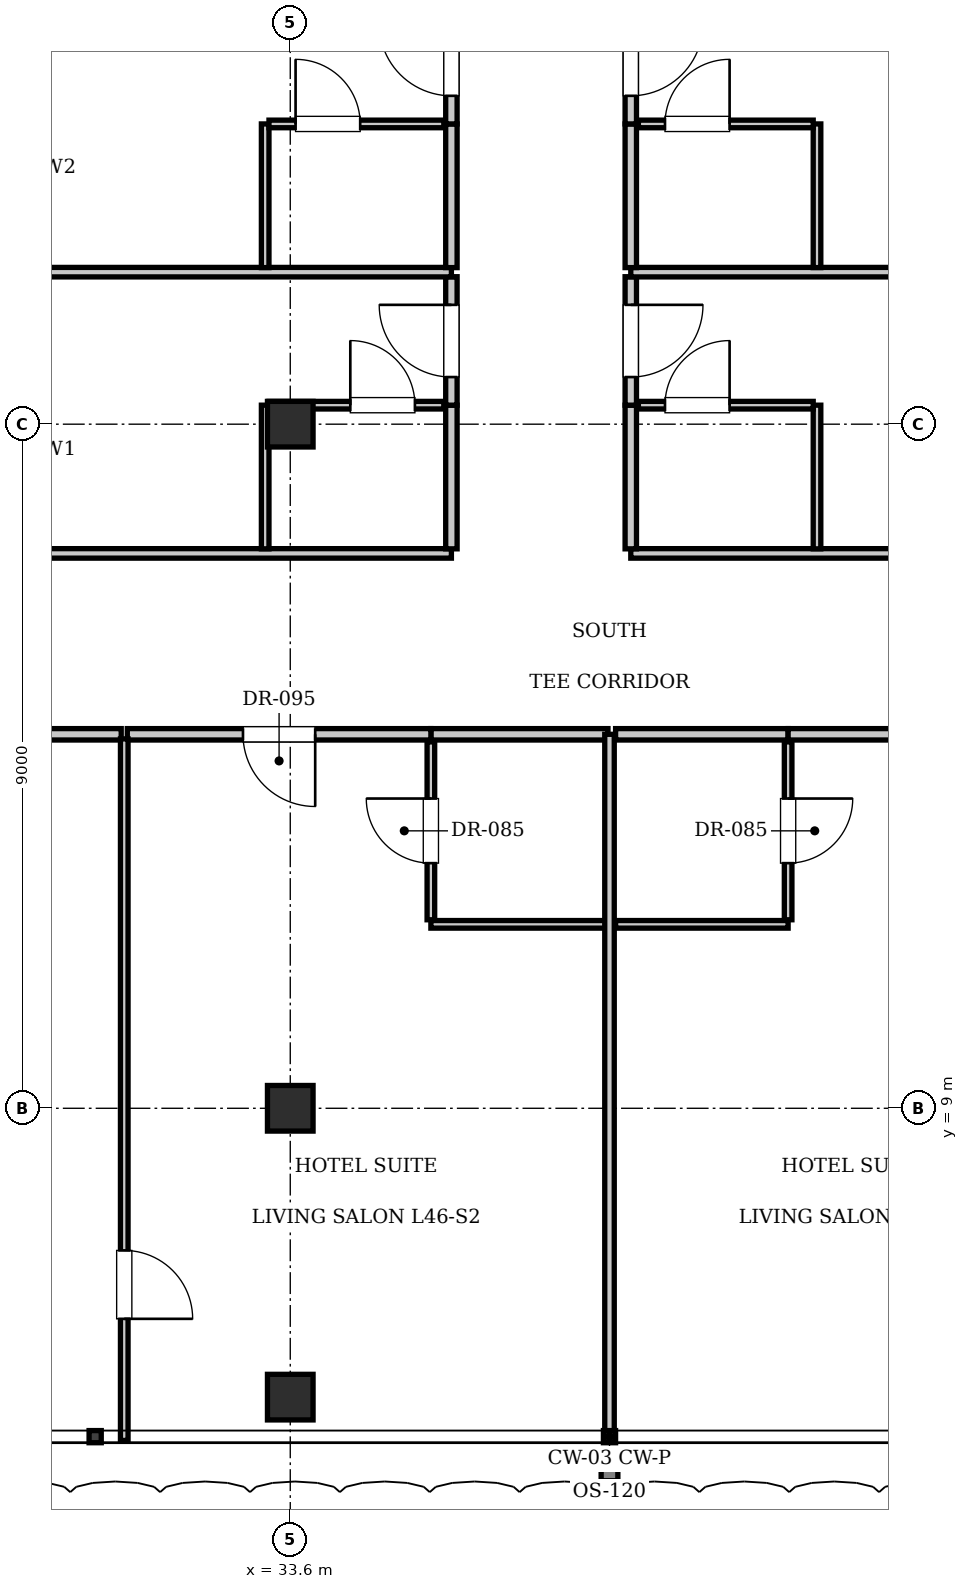
"""IFC4 building model, lengths in metres.
Left out: names, types, materials, properties, quantities, classifications, styles, units other than length and angle.
Written with IfcOpenShell. Run it as: python <this file> out.ifc"""

import sys

from ifc_helpers import new_model, si_unit, direction, frame, frame_2d, origin, origin_2d, place, context, subcontext, project, spatial, rectangle, i_section, extrude, element, fill, save


model = new_model("IFC4")
c1 = context("Model", 3, precision=1e-05, world=origin(), true_north=direction((0.0, 1.0)))
c2 = subcontext(c1, "Body", "Model", "MODEL_VIEW")
j1 = project(units=[si_unit("LENGTHUNIT", "METRE"), si_unit("PLANEANGLEUNIT", "RADIAN")], contexts=[c1])
p1 = place(None, origin())
s1 = spatial("IfcSite", under=j1, at=p1, CompositionType="ELEMENT")
p2 = place(p1, origin())
s2 = spatial("IfcBuilding", under=s1, at=p2, CompositionType="ELEMENT")
p3 = place(p2, frame((0.0, 0.0, 189.0)))
s3 = spatial("IfcBuildingStorey", under=s2, at=p3, CompositionType="ELEMENT", Elevation=189.0)
for number, where, z_axis, x_axis in (
    (1, (33.6, 9.0, 0.0), (0.0, 0.0, 1.0), (1.0, 0.0, 0.0)),
    (2, (33.6, 18.0, 0.0), (0.0, 0.0, 1.0), (1.0, 0.0, 0.0)),
    (3, (33.6, 5.2, 0.0), (0.0, 0.0, 1.0), (1.0, 0.0, 0.0)),
):
    element("IfcColumn", number, at=place(p3, frame(where, z_axis=z_axis, x_axis=x_axis)), inside=s3, PredefinedType="COLUMN", context=c2, shape_type="SweptSolid", body=[
        extrude(i_section(OverallWidth=0.6, OverallDepth=0.6, WebThickness=0.025, FlangeThickness=0.038, at=origin_2d()), origin(), (0.0, 0.0, 1.0), 3.85),
    ])
p4 = place(p3, frame((35.45, 13.92, 0.0), z_axis=(0.0, 0.0, 1.0), x_axis=(1.0, 0.0, 0.0)))
e4 = element("IfcWall", 4, at=p4, inside=s3, PredefinedType="PARTITIONING", context=c2, shape_type="SweptSolid", body=[
    extrude(rectangle(XDim=2.33, YDim=0.15, at=frame_2d((1.165, 0.0))), origin(), (0.0, 0.0, 1.0), 3.61),
])
p5 = place(p3, frame((35.45, 11.42, 0.0), z_axis=(0.0, 0.0, 1.0), x_axis=(1.0, 0.0, 0.0)))
e5 = element("IfcWall", 5, at=p5, inside=s3, PredefinedType="PARTITIONING", context=c2, shape_type="SweptSolid", body=[
    extrude(rectangle(XDim=2.31, YDim=0.1, at=frame_2d((1.155, 0.0))), origin(), (0.0, 0.0, 1.0), 3.61),
])
p6 = place(p3, frame((35.45, 11.48, 0.0), z_axis=(0.0, 0.0, 1.0), x_axis=(0.0, 1.0, 0.0)))
e6 = element("IfcWall", 6, at=p6, inside=s3, PredefinedType="PARTITIONING", context=c2, shape_type="SweptSolid", body=[
    extrude(rectangle(XDim=2.34, YDim=0.1, at=frame_2d((1.17, 0.0))), origin(), (0.0, 0.0, 1.0), 3.61),
])
p7 = place(p6, frame((0.745, 0.0, 0.0)))
e7 = element("IfcOpeningElement", 7, at=p7, cuts=e6, PredefinedType="OPENING", context=c2, shape_type="SweptSolid", body=[
    extrude(rectangle(XDim=0.85, YDim=2.1, at=frame_2d((0.425, 1.05))), frame((0.0, 0.06, 0.0), z_axis=(0.0, -1.0, 0.0), x_axis=(1.0, 0.0, 0.0)), (0.0, 0.0, 1.0), 0.12),
])
p8 = place(p3, frame((26.42, 13.92, 0.0), z_axis=(0.0, 0.0, 1.0), x_axis=(1.0, 0.0, 0.0)))
e8 = element("IfcWall", 8, at=p8, inside=s3, PredefinedType="PARTITIONING", context=c2, shape_type="SweptSolid", body=[
    extrude(rectangle(XDim=4.956, YDim=0.15, at=frame_2d((2.478, 0.0))), origin(), (0.0, 0.0, 1.0), 3.61),
])
p9 = place(p3, frame((31.456, 13.92, 0.0), z_axis=(0.0, 0.0, 1.0), x_axis=(1.0, 0.0, 0.0)))
e9 = element("IfcWall", 9, at=p9, inside=s3, PredefinedType="PARTITIONING", context=c2, shape_type="SweptSolid", body=[
    extrude(rectangle(XDim=3.994, YDim=0.15, at=frame_2d((1.997, 0.0))), origin(), (0.0, 0.0, 1.0), 3.61),
])
p10 = place(p9, frame((1.522, 0.0, 0.0)))
e10 = element("IfcOpeningElement", 10, at=p10, cuts=e9, PredefinedType="OPENING", context=c2, shape_type="SweptSolid", body=[
    extrude(rectangle(XDim=0.95, YDim=2.15, at=frame_2d((0.475, 1.075))), frame((0.0, 0.085, 0.0), z_axis=(0.0, -1.0, 0.0), x_axis=(1.0, 0.0, 0.0)), (0.0, 0.0, 1.0), 0.17),
])
p11 = place(p3, frame((31.416, 4.63, 0.0), z_axis=(0.0, 0.0, 1.0), x_axis=(0.0, 1.0, 0.0)))
e11 = element("IfcWall", 11, at=p11, inside=s3, PredefinedType="PARTITIONING", context=c2, shape_type="SweptSolid", body=[
    extrude(rectangle(XDim=9.23, YDim=0.1, at=frame_2d((4.615, 0.0))), origin(), (0.0, 0.0, 1.0), 3.61),
])
p12 = place(p11, frame((1.6, 0.0, 0.0)))
e12 = element("IfcOpeningElement", 12, at=p12, cuts=e11, PredefinedType="OPENING", context=c2, shape_type="SweptSolid", body=[
    extrude(rectangle(XDim=0.9, YDim=2.1, at=frame_2d((0.45, 1.05))), frame((0.0, 0.06, 0.0), z_axis=(0.0, -1.0, 0.0), x_axis=(1.0, 0.0, 0.0)), (0.0, 0.0, 1.0), 0.12),
])
p13 = place(p3, frame((37.8, 4.7, 0.0), z_axis=(0.0, 0.0, 1.0), x_axis=(0.0, 1.0, 0.0)))
e13 = element("IfcWall", 13, at=p13, inside=s3, PredefinedType="PARTITIONING", context=c2, shape_type="SweptSolid", body=[
    extrude(rectangle(XDim=9.22, YDim=0.125, at=frame_2d((4.61, 0.0))), origin(), (0.0, 0.0, 1.0), 3.293),
])
p14 = place(p3, frame((37.88, 13.92, 0.0), z_axis=(0.0, 0.0, 1.0), x_axis=(1.0, 0.0, 0.0)))
e14 = element("IfcWall", 14, at=p14, inside=s3, PredefinedType="PARTITIONING", context=c2, shape_type="SweptSolid", body=[
    extrude(rectangle(XDim=2.27, YDim=0.15, at=frame_2d((1.135, 0.0))), origin(), (0.0, 0.0, 1.0), 3.61),
])
p15 = place(p3, frame((37.88, 11.42, 0.0), z_axis=(0.0, 0.0, 1.0), x_axis=(1.0, 0.0, 0.0)))
e15 = element("IfcWall", 15, at=p15, inside=s3, PredefinedType="PARTITIONING", context=c2, shape_type="SweptSolid", body=[
    extrude(rectangle(XDim=2.27, YDim=0.1, at=frame_2d((1.135, 0.0))), origin(), (0.0, 0.0, 1.0), 3.61),
])
p16 = place(p3, frame((40.15, 11.48, 0.0), z_axis=(0.0, 0.0, 1.0), x_axis=(0.0, 1.0, 0.0)))
e16 = element("IfcWall", 16, at=p16, inside=s3, PredefinedType="PARTITIONING", context=c2, shape_type="SweptSolid", body=[
    extrude(rectangle(XDim=2.34, YDim=0.1, at=frame_2d((1.17, 0.0))), origin(), (0.0, 0.0, 1.0), 3.61),
])
p17 = place(p16, frame((0.745, 0.0, 0.0)))
e17 = element("IfcOpeningElement", 17, at=p17, cuts=e16, PredefinedType="OPENING", context=c2, shape_type="SweptSolid", body=[
    extrude(rectangle(XDim=0.85, YDim=2.1, at=frame_2d((0.425, 1.05))), frame((0.0, 0.06, 0.0), z_axis=(0.0, -1.0, 0.0), x_axis=(1.0, 0.0, 0.0)), (0.0, 0.0, 1.0), 0.12),
])
p18 = place(p3, frame((40.15, 13.92, 0.0), z_axis=(0.0, 0.0, 1.0), x_axis=(1.0, 0.0, 0.0)))
e18 = element("IfcWall", 18, at=p18, inside=s3, PredefinedType="PARTITIONING", context=c2, shape_type="SweptSolid", body=[
    extrude(rectangle(XDim=3.994, YDim=0.15, at=frame_2d((1.997, 0.0))), origin(), (0.0, 0.0, 1.0), 3.61),
])
p19 = place(p18, frame((1.522, 0.0, 0.0)))
e19 = element("IfcOpeningElement", 19, at=p19, cuts=e18, PredefinedType="OPENING", context=c2, shape_type="SweptSolid", body=[
    extrude(rectangle(XDim=0.95, YDim=2.15, at=frame_2d((0.475, 1.075))), frame((0.0, 0.085, 0.0), z_axis=(0.0, -1.0, 0.0), x_axis=(1.0, 0.0, 0.0)), (0.0, 0.0, 1.0), 0.17),
])
p20 = place(p3, frame((13.2, 16.3, 0.0), z_axis=(0.0, 0.0, 1.0), x_axis=(1.0, 0.0, 0.0)))
e20 = element("IfcWall", 20, at=p20, inside=s3, PredefinedType="PARTITIONING", context=c2, shape_type="SweptSolid", body=[
    extrude(rectangle(XDim=22.52, YDim=0.125, at=frame_2d((11.26, 0.0))), origin(), (0.0, 0.0, 1.0), 3.61),
])
p21 = place(p3, frame((38.08, 16.3, 0.0), z_axis=(0.0, 0.0, 1.0), x_axis=(1.0, 0.0, 0.0)))
e21 = element("IfcWall", 21, at=p21, inside=s3, PredefinedType="PARTITIONING", context=c2, shape_type="SweptSolid", body=[
    extrude(rectangle(XDim=24.32, YDim=0.125, at=frame_2d((12.16, 0.0))), origin(), (0.0, 0.0, 1.0), 3.61),
])
p22 = place(p3, frame((35.72, 16.36, 0.0), z_axis=(0.0, 0.0, 1.0), x_axis=(0.0, 1.0, 0.0)))
e22 = element("IfcWall", 22, at=p22, inside=s3, PredefinedType="PARTITIONING", context=c2, shape_type="SweptSolid", body=[
    extrude(rectangle(XDim=1.89, YDim=0.15, at=frame_2d((0.945, 0.0))), origin(), (0.0, 0.0, 1.0), 3.61),
])
p23 = place(p3, frame((35.72, 18.25, 0.0), z_axis=(0.0, 0.0, 1.0), x_axis=(0.0, 1.0, 0.0)))
e23 = element("IfcWall", 23, at=p23, inside=s3, PredefinedType="PARTITIONING", context=c2, shape_type="SweptSolid", body=[
    extrude(rectangle(XDim=1.69, YDim=0.15, at=frame_2d((0.845, 0.0))), origin(), (0.0, 0.0, 1.0), 3.61),
])
p24 = place(p23, frame((0.37, 0.0, 0.0)))
e24 = element("IfcOpeningElement", 24, at=p24, cuts=e23, PredefinedType="OPENING", context=c2, shape_type="SweptSolid", body=[
    extrude(rectangle(XDim=0.95, YDim=2.15, at=frame_2d((0.475, 1.075))), frame((0.0, 0.085, 0.0), z_axis=(0.0, -1.0, 0.0), x_axis=(1.0, 0.0, 0.0)), (0.0, 0.0, 1.0), 0.17),
])
p25 = place(p3, frame((33.27, 16.36, 0.0), z_axis=(0.0, 0.0, 1.0), x_axis=(0.0, 1.0, 0.0)))
e25 = element("IfcWall", 25, at=p25, inside=s3, PredefinedType="PARTITIONING", context=c2, shape_type="SweptSolid", body=[
    extrude(rectangle(XDim=1.89, YDim=0.1, at=frame_2d((0.945, 0.0))), origin(), (0.0, 0.0, 1.0), 3.61),
])
p26 = place(p3, frame((33.32, 18.25, 0.0), z_axis=(0.0, 0.0, 1.0), x_axis=(1.0, 0.0, 0.0)))
e26 = element("IfcWall", 26, at=p26, inside=s3, PredefinedType="PARTITIONING", context=c2, shape_type="SweptSolid", body=[
    extrude(rectangle(XDim=2.3, YDim=0.1, at=frame_2d((1.15, 0.0))), origin(), (0.0, 0.0, 1.0), 3.61),
])
p27 = place(p26, frame((1.07, 0.0, 0.0)))
e27 = element("IfcOpeningElement", 27, at=p27, cuts=e26, PredefinedType="OPENING", context=c2, shape_type="SweptSolid", body=[
    extrude(rectangle(XDim=0.85, YDim=2.1, at=frame_2d((0.425, 1.05))), frame((0.0, 0.06, 0.0), z_axis=(0.0, -1.0, 0.0), x_axis=(1.0, 0.0, 0.0)), (0.0, 0.0, 1.0), 0.12),
])
p28 = place(p3, frame((38.08, 16.36, 0.0), z_axis=(0.0, 0.0, 1.0), x_axis=(0.0, 1.0, 0.0)))
e28 = element("IfcWall", 28, at=p28, inside=s3, PredefinedType="PARTITIONING", context=c2, shape_type="SweptSolid", body=[
    extrude(rectangle(XDim=1.89, YDim=0.15, at=frame_2d((0.945, 0.0))), origin(), (0.0, 0.0, 1.0), 3.61),
])
p29 = place(p3, frame((38.08, 18.25, 0.0), z_axis=(0.0, 0.0, 1.0), x_axis=(0.0, 1.0, 0.0)))
e29 = element("IfcWall", 29, at=p29, inside=s3, PredefinedType="PARTITIONING", context=c2, shape_type="SweptSolid", body=[
    extrude(rectangle(XDim=1.69, YDim=0.15, at=frame_2d((0.845, 0.0))), origin(), (0.0, 0.0, 1.0), 3.61),
])
p30 = place(p29, frame((0.37, 0.0, 0.0)))
e30 = element("IfcOpeningElement", 30, at=p30, cuts=e29, PredefinedType="OPENING", context=c2, shape_type="SweptSolid", body=[
    extrude(rectangle(XDim=0.95, YDim=2.15, at=frame_2d((0.475, 1.075))), frame((0.0, 0.085, 0.0), z_axis=(0.0, -1.0, 0.0), x_axis=(1.0, 0.0, 0.0)), (0.0, 0.0, 1.0), 0.17),
])
p31 = place(p3, frame((40.53, 16.36, 0.0), z_axis=(0.0, 0.0, 1.0), x_axis=(0.0, 1.0, 0.0)))
e31 = element("IfcWall", 31, at=p31, inside=s3, PredefinedType="PARTITIONING", context=c2, shape_type="SweptSolid", body=[
    extrude(rectangle(XDim=1.89, YDim=0.1, at=frame_2d((0.945, 0.0))), origin(), (0.0, 0.0, 1.0), 3.61),
])
p32 = place(p3, frame((38.18, 18.25, 0.0), z_axis=(0.0, 0.0, 1.0), x_axis=(1.0, 0.0, 0.0)))
e32 = element("IfcWall", 32, at=p32, inside=s3, PredefinedType="PARTITIONING", context=c2, shape_type="SweptSolid", body=[
    extrude(rectangle(XDim=2.3, YDim=0.1, at=frame_2d((1.15, 0.0))), origin(), (0.0, 0.0, 1.0), 3.61),
])
p33 = place(p32, frame((0.35, 0.0, 0.0)))
e33 = element("IfcOpeningElement", 33, at=p33, cuts=e32, PredefinedType="OPENING", context=c2, shape_type="SweptSolid", body=[
    extrude(rectangle(XDim=0.85, YDim=2.1, at=frame_2d((0.425, 1.05))), frame((0.0, 0.06, 0.0), z_axis=(0.0, -1.0, 0.0), x_axis=(1.0, 0.0, 0.0)), (0.0, 0.0, 1.0), 0.12),
])
p34 = place(p3, frame((13.2, 20.0, 0.0), z_axis=(0.0, 0.0, 1.0), x_axis=(1.0, 0.0, 0.0)))
e34 = element("IfcWall", 34, at=p34, inside=s3, PredefinedType="PARTITIONING", context=c2, shape_type="SweptSolid", body=[
    extrude(rectangle(XDim=22.52, YDim=0.125, at=frame_2d((11.26, 0.0))), origin(), (0.0, 0.0, 1.0), 3.61),
])
p35 = place(p3, frame((38.08, 20.0, 0.0), z_axis=(0.0, 0.0, 1.0), x_axis=(1.0, 0.0, 0.0)))
e35 = element("IfcWall", 35, at=p35, inside=s3, PredefinedType="PARTITIONING", context=c2, shape_type="SweptSolid", body=[
    extrude(rectangle(XDim=24.32, YDim=0.125, at=frame_2d((12.16, 0.0))), origin(), (0.0, 0.0, 1.0), 3.61),
])
p36 = place(p3, frame((35.72, 20.06, 0.0), z_axis=(0.0, 0.0, 1.0), x_axis=(0.0, 1.0, 0.0)))
e36 = element("IfcWall", 36, at=p36, inside=s3, PredefinedType="PARTITIONING", context=c2, shape_type="SweptSolid", body=[
    extrude(rectangle(XDim=1.89, YDim=0.15, at=frame_2d((0.945, 0.0))), origin(), (0.0, 0.0, 1.0), 3.61),
])
p37 = place(p3, frame((35.72, 21.95, 0.0), z_axis=(0.0, 0.0, 1.0), x_axis=(0.0, 1.0, 0.0)))
e37 = element("IfcWall", 37, at=p37, inside=s3, PredefinedType="PARTITIONING", context=c2, shape_type="SweptSolid", body=[
    extrude(rectangle(XDim=1.69, YDim=0.15, at=frame_2d((0.845, 0.0))), origin(), (0.0, 0.0, 1.0), 3.61),
])
p38 = place(p37, frame((0.37, 0.0, 0.0)))
e38 = element("IfcOpeningElement", 38, at=p38, cuts=e37, PredefinedType="OPENING", context=c2, shape_type="SweptSolid", body=[
    extrude(rectangle(XDim=0.95, YDim=2.15, at=frame_2d((0.475, 1.075))), frame((0.0, 0.085, 0.0), z_axis=(0.0, -1.0, 0.0), x_axis=(1.0, 0.0, 0.0)), (0.0, 0.0, 1.0), 0.17),
])
p39 = place(p3, frame((33.27, 20.06, 0.0), z_axis=(0.0, 0.0, 1.0), x_axis=(0.0, 1.0, 0.0)))
e39 = element("IfcWall", 39, at=p39, inside=s3, PredefinedType="PARTITIONING", context=c2, shape_type="SweptSolid", body=[
    extrude(rectangle(XDim=1.89, YDim=0.1, at=frame_2d((0.945, 0.0))), origin(), (0.0, 0.0, 1.0), 3.61),
])
p40 = place(p3, frame((33.32, 21.95, 0.0), z_axis=(0.0, 0.0, 1.0), x_axis=(1.0, 0.0, 0.0)))
e40 = element("IfcWall", 40, at=p40, inside=s3, PredefinedType="PARTITIONING", context=c2, shape_type="SweptSolid", body=[
    extrude(rectangle(XDim=2.3, YDim=0.1, at=frame_2d((1.15, 0.0))), origin(), (0.0, 0.0, 1.0), 3.61),
])
p41 = place(p40, frame((0.35, 0.0, 0.0)))
e41 = element("IfcOpeningElement", 41, at=p41, cuts=e40, PredefinedType="OPENING", context=c2, shape_type="SweptSolid", body=[
    extrude(rectangle(XDim=0.85, YDim=2.1, at=frame_2d((0.425, 1.05))), frame((0.0, 0.06, 0.0), z_axis=(0.0, -1.0, 0.0), x_axis=(1.0, 0.0, 0.0)), (0.0, 0.0, 1.0), 0.12),
])
p42 = place(p3, frame((38.08, 20.06, 0.0), z_axis=(0.0, 0.0, 1.0), x_axis=(0.0, 1.0, 0.0)))
e42 = element("IfcWall", 42, at=p42, inside=s3, PredefinedType="PARTITIONING", context=c2, shape_type="SweptSolid", body=[
    extrude(rectangle(XDim=1.89, YDim=0.15, at=frame_2d((0.945, 0.0))), origin(), (0.0, 0.0, 1.0), 3.61),
])
p43 = place(p3, frame((38.08, 21.95, 0.0), z_axis=(0.0, 0.0, 1.0), x_axis=(0.0, 1.0, 0.0)))
e43 = element("IfcWall", 43, at=p43, inside=s3, PredefinedType="PARTITIONING", context=c2, shape_type="SweptSolid", body=[
    extrude(rectangle(XDim=1.69, YDim=0.15, at=frame_2d((0.845, 0.0))), origin(), (0.0, 0.0, 1.0), 3.61),
])
p44 = place(p43, frame((0.37, 0.0, 0.0)))
e44 = element("IfcOpeningElement", 44, at=p44, cuts=e43, PredefinedType="OPENING", context=c2, shape_type="SweptSolid", body=[
    extrude(rectangle(XDim=0.95, YDim=2.15, at=frame_2d((0.475, 1.075))), frame((0.0, 0.085, 0.0), z_axis=(0.0, -1.0, 0.0), x_axis=(1.0, 0.0, 0.0)), (0.0, 0.0, 1.0), 0.17),
])
p45 = place(p3, frame((40.53, 20.06, 0.0), z_axis=(0.0, 0.0, 1.0), x_axis=(0.0, 1.0, 0.0)))
e45 = element("IfcWall", 45, at=p45, inside=s3, PredefinedType="PARTITIONING", context=c2, shape_type="SweptSolid", body=[
    extrude(rectangle(XDim=1.89, YDim=0.1, at=frame_2d((0.945, 0.0))), origin(), (0.0, 0.0, 1.0), 3.61),
])
p46 = place(p3, frame((38.18, 21.95, 0.0), z_axis=(0.0, 0.0, 1.0), x_axis=(1.0, 0.0, 0.0)))
e46 = element("IfcWall", 46, at=p46, inside=s3, PredefinedType="PARTITIONING", context=c2, shape_type="SweptSolid", body=[
    extrude(rectangle(XDim=2.3, YDim=0.1, at=frame_2d((1.15, 0.0))), origin(), (0.0, 0.0, 1.0), 3.61),
])
p47 = place(p46, frame((0.35, 0.0, 0.0)))
e47 = element("IfcOpeningElement", 47, at=p47, cuts=e46, PredefinedType="OPENING", context=c2, shape_type="SweptSolid", body=[
    extrude(rectangle(XDim=0.85, YDim=2.1, at=frame_2d((0.425, 1.05))), frame((0.0, 0.06, 0.0), z_axis=(0.0, -1.0, 0.0), x_axis=(1.0, 0.0, 0.0)), (0.0, 0.0, 1.0), 0.12),
])
p48 = place(p7, origin())
e48 = element("IfcDoor", 48, at=p48, inside=s3, OperationType="SINGLE_SWING_RIGHT", PredefinedType="DOOR", context=c2, shape_type="SweptSolid", body=[
    extrude(rectangle(XDim=0.85, YDim=2.1, at=frame_2d((0.425, 1.05))), frame((0.0, 0.025, 0.0), z_axis=(0.0, -1.0, 0.0), x_axis=(1.0, 0.0, 0.0)), (0.0, 0.0, 1.0), 0.05),
])
fill(e7, e48)
p49 = place(p10, frame((0.95, 0.0, 0.0), z_axis=(0.0, 0.0, 1.0), x_axis=(-1.0, 0.0, 0.0)))
e49 = element("IfcDoor", 49, at=p49, inside=s3, OperationType="SINGLE_SWING_LEFT", PredefinedType="DOOR", context=c2, shape_type="SweptSolid", body=[
    extrude(rectangle(XDim=0.95, YDim=2.15, at=frame_2d((0.475, 1.075))), frame((0.0, 0.025, 0.0), z_axis=(0.0, -1.0, 0.0), x_axis=(1.0, 0.0, 0.0)), (0.0, 0.0, 1.0), 0.05),
])
fill(e10, e49)
p50 = place(p12, frame((0.9, 0.0, 0.0), z_axis=(0.0, 0.0, 1.0), x_axis=(-1.0, 0.0, 0.0)))
e50 = element("IfcDoor", 50, at=p50, inside=s3, OperationType="SINGLE_SWING_RIGHT", PredefinedType="DOOR", context=c2, shape_type="SweptSolid", body=[
    extrude(rectangle(XDim=0.9, YDim=2.1, at=frame_2d((0.45, 1.05))), frame((0.0, 0.025, 0.0), z_axis=(0.0, -1.0, 0.0), x_axis=(1.0, 0.0, 0.0)), (0.0, 0.0, 1.0), 0.05),
])
fill(e12, e50)
p51 = place(p17, frame((0.85, 0.0, 0.0), z_axis=(0.0, 0.0, 1.0), x_axis=(-1.0, 0.0, 0.0)))
e51 = element("IfcDoor", 51, at=p51, inside=s3, OperationType="SINGLE_SWING_LEFT", PredefinedType="DOOR", context=c2, shape_type="SweptSolid", body=[
    extrude(rectangle(XDim=0.85, YDim=2.1, at=frame_2d((0.425, 1.05))), frame((0.0, 0.025, 0.0), z_axis=(0.0, -1.0, 0.0), x_axis=(1.0, 0.0, 0.0)), (0.0, 0.0, 1.0), 0.05),
])
fill(e17, e51)
p52 = place(p27, origin())
e52 = element("IfcDoor", 52, at=p52, inside=s3, OperationType="SINGLE_SWING_LEFT", PredefinedType="DOOR", context=c2, shape_type="SweptSolid", body=[
    extrude(rectangle(XDim=0.85, YDim=2.1, at=frame_2d((0.425, 1.05))), frame((0.0, 0.025, 0.0), z_axis=(0.0, -1.0, 0.0), x_axis=(1.0, 0.0, 0.0)), (0.0, 0.0, 1.0), 0.05),
])
fill(e27, e52)
p53 = place(p24, origin())
e53 = element("IfcDoor", 53, at=p53, inside=s3, OperationType="SINGLE_SWING_RIGHT", PredefinedType="DOOR", context=c2, shape_type="SweptSolid", body=[
    extrude(rectangle(XDim=0.95, YDim=2.15, at=frame_2d((0.475, 1.075))), frame((0.0, 0.025, 0.0), z_axis=(0.0, -1.0, 0.0), x_axis=(1.0, 0.0, 0.0)), (0.0, 0.0, 1.0), 0.05),
])
fill(e24, e53)
p54 = place(p33, origin())
e54 = element("IfcDoor", 54, at=p54, inside=s3, OperationType="SINGLE_SWING_RIGHT", PredefinedType="DOOR", context=c2, shape_type="SweptSolid", body=[
    extrude(rectangle(XDim=0.85, YDim=2.1, at=frame_2d((0.425, 1.05))), frame((0.0, 0.025, 0.0), z_axis=(0.0, -1.0, 0.0), x_axis=(1.0, 0.0, 0.0)), (0.0, 0.0, 1.0), 0.05),
])
fill(e33, e54)
p55 = place(p30, frame((0.95, 0.0, 0.0), z_axis=(0.0, 0.0, 1.0), x_axis=(-1.0, 0.0, 0.0)))
e55 = element("IfcDoor", 55, at=p55, inside=s3, OperationType="SINGLE_SWING_LEFT", PredefinedType="DOOR", context=c2, shape_type="SweptSolid", body=[
    extrude(rectangle(XDim=0.95, YDim=2.15, at=frame_2d((0.475, 1.075))), frame((0.0, 0.025, 0.0), z_axis=(0.0, -1.0, 0.0), x_axis=(1.0, 0.0, 0.0)), (0.0, 0.0, 1.0), 0.05),
])
fill(e30, e55)
p56 = place(p41, origin())
e56 = element("IfcDoor", 56, at=p56, inside=s3, OperationType="SINGLE_SWING_LEFT", PredefinedType="DOOR", context=c2, shape_type="SweptSolid", body=[
    extrude(rectangle(XDim=0.85, YDim=2.1, at=frame_2d((0.425, 1.05))), frame((0.0, 0.025, 0.0), z_axis=(0.0, -1.0, 0.0), x_axis=(1.0, 0.0, 0.0)), (0.0, 0.0, 1.0), 0.05),
])
fill(e41, e56)
p57 = place(p38, origin())
e57 = element("IfcDoor", 57, at=p57, inside=s3, OperationType="SINGLE_SWING_RIGHT", PredefinedType="DOOR", context=c2, shape_type="SweptSolid", body=[
    extrude(rectangle(XDim=0.95, YDim=2.15, at=frame_2d((0.475, 1.075))), frame((0.0, 0.025, 0.0), z_axis=(0.0, -1.0, 0.0), x_axis=(1.0, 0.0, 0.0)), (0.0, 0.0, 1.0), 0.05),
])
fill(e38, e57)
p58 = place(p47, origin())
e58 = element("IfcDoor", 58, at=p58, inside=s3, OperationType="SINGLE_SWING_RIGHT", PredefinedType="DOOR", context=c2, shape_type="SweptSolid", body=[
    extrude(rectangle(XDim=0.85, YDim=2.1, at=frame_2d((0.425, 1.05))), frame((0.0, 0.025, 0.0), z_axis=(0.0, -1.0, 0.0), x_axis=(1.0, 0.0, 0.0)), (0.0, 0.0, 1.0), 0.05),
])
fill(e47, e58)
p59 = place(p44, frame((0.95, 0.0, 0.0), z_axis=(0.0, 0.0, 1.0), x_axis=(-1.0, 0.0, 0.0)))
e59 = element("IfcDoor", 59, at=p59, inside=s3, OperationType="SINGLE_SWING_LEFT", PredefinedType="DOOR", context=c2, shape_type="SweptSolid", body=[
    extrude(rectangle(XDim=0.95, YDim=2.15, at=frame_2d((0.475, 1.075))), frame((0.0, 0.025, 0.0), z_axis=(0.0, -1.0, 0.0), x_axis=(1.0, 0.0, 0.0)), (0.0, 0.0, 1.0), 0.05),
])
fill(e44, e59)
save(model, sys.argv[1])
